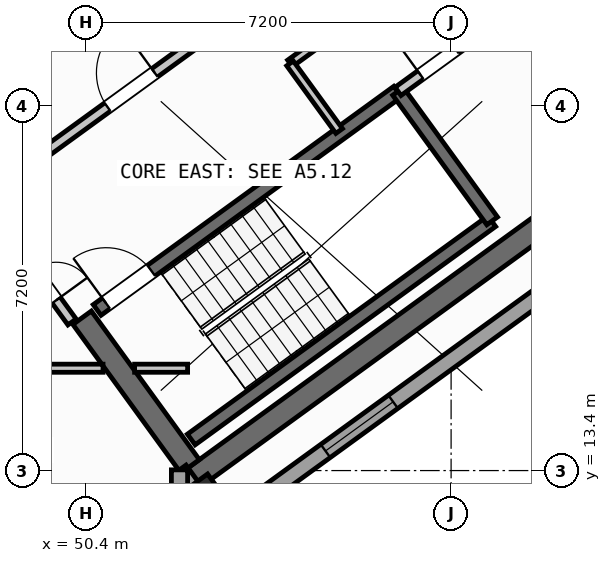
"""IFC4 building model, lengths in metres.
Left out: names, types, materials, properties, quantities, classifications, styles, units other than length and angle.
Written with IfcOpenShell. Run it as: python <this file> out.ifc"""

import sys

from ifc_helpers import new_model, si_unit, direction, frame, frame_2d, origin, origin_2d, place, context, subcontext, project, spatial, rectangle, hollow_rectangle, extrude, source, transform, mapped, element, fill, save


model = new_model("IFC4")
c1 = context("Model", 3, precision=1e-05, world=origin(), true_north=direction((0.0, 1.0)))
c2 = subcontext(c1, "Body", "Model", "MODEL_VIEW")
j1 = project(units=[si_unit("LENGTHUNIT", "METRE"), si_unit("PLANEANGLEUNIT", "RADIAN")], contexts=[c1])
p1 = place(None, origin())
s1 = spatial("IfcSite", under=j1, at=p1, CompositionType="ELEMENT")
p2 = place(p1, origin())
s2 = spatial("IfcBuilding", under=s1, at=p2, CompositionType="ELEMENT")
p3 = place(p2, frame((0.0, 0.0, 211.2)))
s3 = spatial("IfcBuildingStorey", under=s2, at=p3, CompositionType="ELEMENT", Elevation=211.2)
p4 = place(p3, frame((52.399, 13.169, 0.0), z_axis=(0.0, 0.0, 1.0), x_axis=(0.809022352778, 0.587777877013, 0.0)))
e1 = element("IfcWall", 1, at=p4, inside=s3, PredefinedType="SHEAR", context=c2, shape_type="SweptSolid", body=[
    extrude(rectangle(XDim=12.24, YDim=0.45, at=frame_2d((6.12, 0.0))), origin(), (0.0, 0.0, 1.0), 3.35),
])
p5 = place(p3, frame((52.449, 13.483, 0.0), z_axis=(0.0, 0.0, 1.0), x_axis=(-0.587819244441, 0.808992296542, 0.0)))
e2 = element("IfcWall", 2, at=p5, inside=s3, PredefinedType="SHEAR", context=c2, shape_type="SweptSolid", body=[
    extrude(rectangle(XDim=3.625, YDim=0.45, at=frame_2d((1.812, 0.0))), origin(), (0.0, 0.0, 1.0), 3.35),
])
m1 = source(origin(), c2, "Body", "SweptSolid", [
    extrude(hollow_rectangle(XDim=0.8, YDim=0.8, WallThickness=0.032, at=origin_2d()), origin(), (0.0, 0.0, 1.0), 3.6),
])
p6 = place(p3, frame((52.705, 12.773, 0.0), z_axis=(0.0, 0.0, 1.0), x_axis=(0.809016994375, 0.587785252292, 0.0)))
e3 = element("IfcColumn", 3, at=p6, inside=s3, PredefinedType="COLUMN", context=c2, shape_type="MappedRepresentation", body=[
    mapped(m1, transform((0.0, 0.0, 0.0), scale=1.0)),
])
p7 = place(p3, frame((67.454, 22.747, 0.0), z_axis=(0.0, 0.0, 1.0), x_axis=(-0.809021120468, -0.587779573171, 0.0)))
e4 = element("IfcWall", 4, at=p7, inside=s3, PredefinedType="STANDARD", context=c2, shape_type="SweptSolid", body=[
    extrude(rectangle(XDim=17.588, YDim=0.32, at=frame_2d((8.794, 0.0))), origin(), (0.0, 0.0, 1.0), 3.35),
])
p8 = place(p7, frame((1.624, 0.0, 0.0)))
e5 = element("IfcOpeningElement", 5, at=p8, cuts=e4, PredefinedType="OPENING", context=c2, shape_type="SweptSolid", body=[
    extrude(rectangle(XDim=1.05, YDim=2.15, at=frame_2d((0.525, 1.075))), frame((0.0, 0.17, 0.0), z_axis=(0.0, -1.0, 0.0), x_axis=(1.0, 0.0, 0.0)), (0.0, 0.0, 1.0), 0.34),
])
p9 = place(p7, frame((8.344, 0.0, 0.9)))
e6 = element("IfcOpeningElement", 6, at=p9, cuts=e4, PredefinedType="OPENING", context=c2, shape_type="SweptSolid", body=[
    extrude(rectangle(XDim=1.65, YDim=1.45, at=frame_2d((0.825, 0.725))), frame((0.0, 0.17, 0.0), z_axis=(0.0, -1.0, 0.0), x_axis=(1.0, 0.0, 0.0)), (0.0, 0.0, 1.0), 0.34),
])
p10 = place(p7, frame((13.594, 0.0, 0.9)))
e7 = element("IfcOpeningElement", 7, at=p10, cuts=e4, PredefinedType="OPENING", context=c2, shape_type="SweptSolid", body=[
    extrude(rectangle(XDim=1.65, YDim=1.45, at=frame_2d((0.825, 0.725))), frame((0.0, 0.17, 0.0), z_axis=(0.0, -1.0, 0.0), x_axis=(1.0, 0.0, 0.0)), (0.0, 0.0, 1.0), 0.34),
])
p11 = place(p3, frame((52.937, 12.455, 0.0), z_axis=(0.0, 0.0, 1.0), x_axis=(-0.587706324018, 0.809074333241, 0.0)))
e8 = element("IfcWall", 8, at=p11, inside=s3, PredefinedType="STANDARD", context=c2, shape_type="SweptSolid", body=[
    extrude(rectangle(XDim=1.186, YDim=0.32, at=frame_2d((0.593, 0.0))), origin(), (0.0, 0.0, 1.0), 3.35),
])
p12 = place(p3, frame((52.24, 13.414, 0.0), z_axis=(0.0, 0.0, 1.0), x_axis=(0.0, -1.0, 0.0)))
e9 = element("IfcWall", 9, at=p12, inside=s3, PredefinedType="STANDARD", context=c2, shape_type="SweptSolid", body=[
    extrude(rectangle(XDim=9.948, YDim=0.32, at=frame_2d((4.974, 0.0))), origin(), (0.0, 0.0, 1.0), 3.35),
])
p13 = place(p12, frame((3.287, 0.0, 0.9)))
e10 = element("IfcOpeningElement", 10, at=p13, cuts=e9, PredefinedType="OPENING", context=c2, shape_type="SweptSolid", body=[
    extrude(rectangle(XDim=1.65, YDim=1.45, at=frame_2d((0.825, 0.725))), frame((0.0, 0.17, 0.0), z_axis=(0.0, -1.0, 0.0), x_axis=(1.0, 0.0, 0.0)), (0.0, 0.0, 1.0), 0.34),
])
p14 = place(p12, frame((7.808, 0.0, 0.9)))
e11 = element("IfcOpeningElement", 11, at=p14, cuts=e9, PredefinedType="OPENING", context=c2, shape_type="SweptSolid", body=[
    extrude(rectangle(XDim=1.35, YDim=1.45, at=frame_2d((0.675, 0.725))), frame((0.0, 0.17, 0.0), z_axis=(0.0, -1.0, 0.0), x_axis=(1.0, 0.0, 0.0)), (0.0, 0.0, 1.0), 0.34),
])
p15 = place(p3, frame((52.472, 14.013, 0.0), z_axis=(0.0, 0.0, 1.0), x_axis=(0.809028366311, 0.587769599847, 0.0)))
e12 = element("IfcWall", 12, at=p15, inside=s3, PredefinedType="SHEAR", context=c2, shape_type="SweptSolid", body=[
    extrude(rectangle(XDim=7.33, YDim=0.26, at=frame_2d((3.665, 0.0))), origin(), (0.0, 0.0, 1.0), 3.35),
])
p16 = place(p3, frame((50.615, 16.57, 0.0), z_axis=(0.0, 0.0, 1.0), x_axis=(0.809028366311, 0.587769599847, 0.0)))
e13 = element("IfcWall", 13, at=p16, inside=s3, PredefinedType="SHEAR", context=c2, shape_type="SweptSolid", body=[
    extrude(rectangle(XDim=7.33, YDim=0.26, at=frame_2d((3.665, 0.0))), origin(), (0.0, 0.0, 1.0), 3.35),
])
p17 = place(p16, frame((0.22, 0.0, 0.0)))
e14 = element("IfcOpeningElement", 14, at=p17, cuts=e13, PredefinedType="OPENING", context=c2, shape_type="SweptSolid", body=[
    extrude(rectangle(XDim=1.1, YDim=2.1, at=frame_2d((0.55, 1.05))), frame((0.0, 0.14, 0.0), z_axis=(0.0, -1.0, 0.0), x_axis=(1.0, 0.0, 0.0)), (0.0, 0.0, 1.0), 0.28),
])
p18 = place(p3, frame((58.41, 18.327, 0.0), z_axis=(0.0, 0.0, 1.0), x_axis=(-0.58776738483, 0.809029975545, 0.0)))
e15 = element("IfcWall", 15, at=p18, inside=s3, PredefinedType="SHEAR", context=c2, shape_type="SweptSolid", body=[
    extrude(rectangle(XDim=3.16, YDim=0.26, at=frame_2d((1.58, 0.0))), origin(), (0.0, 0.0, 1.0), 3.35),
])
p19 = place(p3, frame((47.025, 21.378, 0.0), z_axis=(0.0, 0.0, 1.0), x_axis=(0.809052869724, 0.587735870941, 0.0)))
e16 = element("IfcWall", 16, at=p19, inside=s3, PredefinedType="STANDARD", context=c2, shape_type="SweptSolid", body=[
    extrude(rectangle(XDim=3.498, YDim=0.2, at=frame_2d((1.749, 0.0))), origin(), (0.0, 0.0, 1.0), 3.34),
])
p20 = place(p19, frame((0.508, 0.0, 0.0)))
e17 = element("IfcOpeningElement", 17, at=p20, cuts=e16, PredefinedType="OPENING", context=c2, shape_type="SweptSolid", body=[
    extrude(rectangle(XDim=1.3, YDim=2.2, at=frame_2d((0.65, 1.1))), frame((0.0, 0.11, 0.0), z_axis=(0.0, -1.0, 0.0), x_axis=(1.0, 0.0, 0.0)), (0.0, 0.0, 1.0), 0.22),
])
p21 = place(p3, frame((48.718, 19.048, 0.0), z_axis=(0.0, 0.0, 1.0), x_axis=(0.809017261719, 0.587784884325, 0.0)))
e18 = element("IfcWall", 18, at=p21, inside=s3, PredefinedType="STANDARD", context=c2, shape_type="SweptSolid", body=[
    extrude(rectangle(XDim=5.818, YDim=0.2, at=frame_2d((2.909, 0.0))), origin(), (0.0, 0.0, 1.0), 3.34),
])
p22 = place(p21, frame((2.598, 0.0, 0.0)))
e19 = element("IfcOpeningElement", 19, at=p22, cuts=e18, PredefinedType="OPENING", context=c2, shape_type="SweptSolid", body=[
    extrude(rectangle(XDim=1.15, YDim=2.1, at=frame_2d((0.575, 1.05))), frame((0.0, 0.11, 0.0), z_axis=(0.0, -1.0, 0.0), x_axis=(1.0, 0.0, 0.0)), (0.0, 0.0, 1.0), 0.22),
])
p23 = place(p3, frame((56.553, 20.884, 0.0), z_axis=(0.0, 0.0, 1.0), x_axis=(0.809041669066, 0.587751288995, 0.0)))
e20 = element("IfcWall", 20, at=p23, inside=s3, PredefinedType="STANDARD", context=c2, shape_type="SweptSolid", body=[
    extrude(rectangle(XDim=3.868, YDim=0.2, at=frame_2d((1.934, 0.0))), origin(), (0.0, 0.0, 1.0), 3.34),
])
p24 = place(p23, frame((0.55, 0.0, 0.0)))
e21 = element("IfcOpeningElement", 21, at=p24, cuts=e20, PredefinedType="OPENING", context=c2, shape_type="SweptSolid", body=[
    extrude(rectangle(XDim=0.86, YDim=2.05, at=frame_2d((0.43, 1.025))), frame((0.0, 0.11, 0.0), z_axis=(0.0, -1.0, 0.0), x_axis=(1.0, 0.0, 0.0)), (0.0, 0.0, 1.0), 0.22),
])
p25 = place(p3, frame((54.421, 21.436, 0.0), z_axis=(0.0, 0.0, 1.0), x_axis=(0.809013710463, 0.587789772183, 0.0)))
e22 = element("IfcWall", 22, at=p25, inside=s3, PredefinedType="PARTITIONING", context=c2, shape_type="SweptSolid", body=[
    extrude(rectangle(XDim=5.36, YDim=0.16, at=frame_2d((2.68, 0.0))), origin(), (0.0, 0.0, 1.0), 3.34),
])
p26 = place(p25, frame((1.4, 0.0, 0.0)))
e23 = element("IfcOpeningElement", 23, at=p26, cuts=e22, PredefinedType="OPENING", context=c2, shape_type="SweptSolid", body=[
    extrude(rectangle(XDim=0.86, YDim=2.05, at=frame_2d((0.43, 1.025))), frame((0.0, 0.09, 0.0), z_axis=(0.0, -1.0, 0.0), x_axis=(1.0, 0.0, 0.0)), (0.0, 0.0, 1.0), 0.18),
])
p27 = place(p3, frame((55.391, 20.102, 0.0), z_axis=(0.0, 0.0, 1.0), x_axis=(-0.58778447739, 0.809017557374, 0.0)))
e24 = element("IfcWall", 24, at=p27, inside=s3, PredefinedType="PARTITIONING", context=c2, shape_type="SweptSolid", body=[
    extrude(rectangle(XDim=1.65, YDim=0.16, at=frame_2d((0.825, 0.0))), origin(), (0.0, 0.0, 1.0), 3.34),
])
p28 = place(p3, frame((35.178, 15.42, 0.0), z_axis=(0.0, 0.0, 1.0), x_axis=(1.0, 0.0, 0.0)))
e25 = element("IfcWall", 25, at=p28, inside=s3, PredefinedType="PARTITIONING", context=c2, shape_type="SweptSolid", body=[
    extrude(rectangle(XDim=15.552, YDim=0.16, at=frame_2d((7.776, 0.0))), origin(), (0.0, 0.0, 1.0), 3.34),
])
p29 = place(p28, frame((3.885, 0.0, 0.0)))
e26 = element("IfcOpeningElement", 26, at=p29, cuts=e25, PredefinedType="OPENING", context=c2, shape_type="SweptSolid", body=[
    extrude(rectangle(XDim=1.0, YDim=2.1, at=frame_2d((0.5, 1.05))), frame((0.0, 0.09, 0.0), z_axis=(0.0, -1.0, 0.0), x_axis=(1.0, 0.0, 0.0)), (0.0, 0.0, 1.0), 0.18),
])
p30 = place(p3, frame((51.354, 15.42, 0.0), z_axis=(0.0, 0.0, 1.0), x_axis=(1.0, 0.0, 0.0)))
e27 = element("IfcWall", 27, at=p30, inside=s3, PredefinedType="PARTITIONING", context=c2, shape_type="SweptSolid", body=[
    extrude(rectangle(XDim=1.046, YDim=0.16, at=frame_2d((0.523, 0.0))), origin(), (0.0, 0.0, 1.0), 3.34),
])
p31 = place(p3, frame((50.119, 16.333, 0.0), z_axis=(0.0, 0.0, 1.0), x_axis=(-0.587749856981, 0.809042709391, 0.0)))
e28 = element("IfcWall", 28, at=p31, inside=s3, PredefinedType="STANDARD", context=c2, shape_type="SweptSolid", body=[
    extrude(rectangle(XDim=2.96, YDim=0.2, at=frame_2d((1.48, 0.0))), origin(), (0.0, 0.0, 1.0), 3.34),
])
p32 = place(p31, frame((0.53, 0.0, 0.0)))
e29 = element("IfcOpeningElement", 29, at=p32, cuts=e28, PredefinedType="OPENING", context=c2, shape_type="SweptSolid", body=[
    extrude(rectangle(XDim=1.5, YDim=2.15, at=frame_2d((0.75, 1.075))), frame((0.0, 0.11, 0.0), z_axis=(0.0, -1.0, 0.0), x_axis=(1.0, 0.0, 0.0)), (0.0, 0.0, 1.0), 0.22),
])
m2 = source(origin(), c2, "Body", "SweptSolid", [
    extrude(rectangle(XDim=1.65, YDim=1.45, at=frame_2d((0.825, 0.725))), frame((0.0, 0.03, 0.0), z_axis=(0.0, -1.0, 0.0), x_axis=(1.0, 0.0, 0.0)), (0.0, 0.0, 1.0), 0.06),
])
p33 = place(p10, origin())
e30 = element("IfcWindow", 30, at=p33, inside=s3, PartitioningType="SINGLE_PANEL", PredefinedType="WINDOW", context=c2, shape_type="MappedRepresentation", body=[
    mapped(m2, transform((0.0, 0.0, 0.0), scale=1.0)),
])
fill(e7, e30)
m3 = source(origin(), c2, "Body", "SweptSolid", [
    extrude(rectangle(XDim=1.1, YDim=2.1, at=frame_2d((0.55, 1.05))), frame((0.0, 0.025, 0.0), z_axis=(0.0, -1.0, 0.0), x_axis=(1.0, 0.0, 0.0)), (0.0, 0.0, 1.0), 0.05),
])
p34 = place(p17, origin())
e31 = element("IfcDoor", 31, at=p34, inside=s3, OperationType="SINGLE_SWING_LEFT", PredefinedType="DOOR", context=c2, shape_type="MappedRepresentation", body=[
    mapped(m3, transform((0.0, 0.0, 0.0), scale=1.0)),
])
fill(e14, e31)
m4 = source(origin(), c2, "Body", "SweptSolid", [
    extrude(rectangle(XDim=1.15, YDim=2.1, at=frame_2d((0.575, 1.05))), frame((0.0, 0.025, 0.0), z_axis=(0.0, -1.0, 0.0), x_axis=(1.0, 0.0, 0.0)), (0.0, 0.0, 1.0), 0.05),
])
p35 = place(p22, origin())
e32 = element("IfcDoor", 32, at=p35, inside=s3, OperationType="SINGLE_SWING_RIGHT", PredefinedType="DOOR", context=c2, shape_type="MappedRepresentation", body=[
    mapped(m4, transform((0.0, 0.0, 0.0), scale=1.0)),
])
fill(e19, e32)
m5 = source(origin(), c2, "Body", "SweptSolid", [
    extrude(rectangle(XDim=0.86, YDim=2.05, at=frame_2d((0.43, 1.025))), frame((0.0, 0.025, 0.0), z_axis=(0.0, -1.0, 0.0), x_axis=(1.0, 0.0, 0.0)), (0.0, 0.0, 1.0), 0.05),
])
p36 = place(p24, origin())
e33 = element("IfcDoor", 33, at=p36, inside=s3, OperationType="SINGLE_SWING_LEFT", PredefinedType="DOOR", context=c2, shape_type="MappedRepresentation", body=[
    mapped(m5, transform((0.0, 0.0, 0.0), scale=1.0)),
])
fill(e21, e33)
m6 = source(origin(), c2, "Body", "SweptSolid", [
    extrude(rectangle(XDim=1.5, YDim=2.15, at=frame_2d((0.75, 1.075))), frame((0.0, 0.025, 0.0), z_axis=(0.0, -1.0, 0.0), x_axis=(1.0, 0.0, 0.0)), (0.0, 0.0, 1.0), 0.05),
])
p37 = place(p32, frame((1.5, 0.0, 0.0), z_axis=(0.0, 0.0, 1.0), x_axis=(-1.0, 0.0, 0.0)))
e34 = element("IfcDoor", 34, at=p37, inside=s3, OperationType="DOUBLE_DOOR_SINGLE_SWING", PredefinedType="DOOR", context=c2, shape_type="MappedRepresentation", body=[
    mapped(m6, transform((0.0, 0.0, 0.0), scale=1.0)),
])
fill(e29, e34)
save(model, sys.argv[1])
